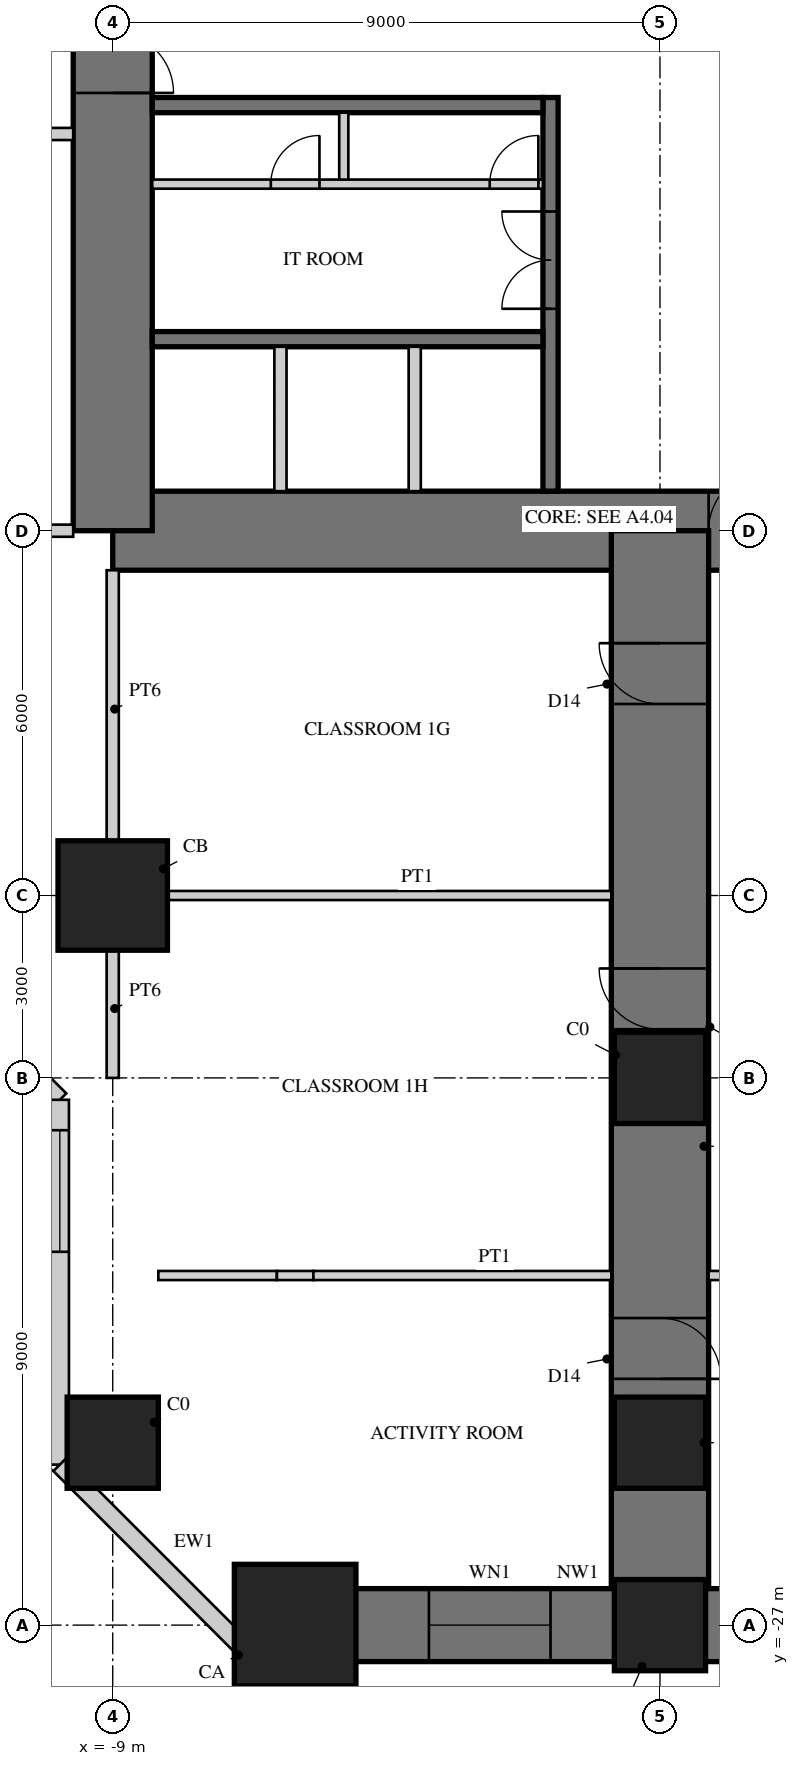
"""IFC4 building model, lengths in metres.
Left out: names, types, materials, properties, quantities, classifications, styles, units other than length and angle.
Written with IfcOpenShell. Run it as: python <this file> out.ifc"""

import sys

from ifc_helpers import new_model, si_unit, direction, frame, frame_2d, origin, origin_2d, place, context, subcontext, project, spatial, rectangle, hollow_rectangle, extrude, element, fill, save


model = new_model("IFC4")
c1 = context("Model", 3, precision=1e-05, world=origin(), true_north=direction((0.0, 1.0)))
c2 = subcontext(c1, "Body", "Model", "MODEL_VIEW")
j1 = project(units=[si_unit("LENGTHUNIT", "METRE"), si_unit("PLANEANGLEUNIT", "RADIAN")], contexts=[c1])
p1 = place(None, origin())
s1 = spatial("IfcSite", under=j1, at=p1, CompositionType="ELEMENT")
p2 = place(p1, origin())
s2 = spatial("IfcBuilding", under=s1, at=p2, CompositionType="ELEMENT")
p3 = place(p2, frame((0.0, 0.0, 5.0)))
s3 = spatial("IfcBuildingStorey", under=s2, at=p3, CompositionType="ELEMENT", Elevation=5.0)
p4 = place(p3, frame((-9.0, -9.0, 0.0), z_axis=(0.0, 0.0, 1.0), x_axis=(1.0, 0.0, 0.0)))
e1 = element("IfcWall", 1, at=p4, inside=s3, PredefinedType="SHEAR", context=c2, shape_type="SweptSolid", body=[
    extrude(rectangle(XDim=18.0, YDim=1.3, at=frame_2d((9.0, 0.0))), origin(), (0.0, 0.0, 1.0), 4.5),
])
p5 = place(p4, frame((9.8, 0.0, 0.0)))
e2 = element("IfcOpeningElement", 2, at=p5, cuts=e1, PredefinedType="OPENING", context=c2, shape_type="SweptSolid", body=[
    extrude(rectangle(XDim=1.0, YDim=2.4, at=frame_2d((0.5, 1.2))), frame((0.0, 0.66, 0.0), z_axis=(0.0, -1.0, 0.0), x_axis=(1.0, 0.0, 0.0)), (0.0, 0.0, 1.0), 1.32),
])
p6 = place(p3, frame((-9.0, 9.0, 0.0), z_axis=(0.0, 0.0, 1.0), x_axis=(0.0, -1.0, 0.0)))
e3 = element("IfcWall", 3, at=p6, inside=s3, PredefinedType="SHEAR", context=c2, shape_type="SweptSolid", body=[
    extrude(rectangle(XDim=18.0, YDim=1.3, at=frame_2d((9.0, 0.0))), origin(), (0.0, 0.0, 1.0), 4.5),
])
p7 = place(p6, frame((9.8, 0.0, 0.0)))
e4 = element("IfcOpeningElement", 4, at=p7, cuts=e3, PredefinedType="OPENING", context=c2, shape_type="SweptSolid", body=[
    extrude(rectangle(XDim=1.0, YDim=2.4, at=frame_2d((0.5, 1.2))), frame((0.0, 0.66, 0.0), z_axis=(0.0, -1.0, 0.0), x_axis=(1.0, 0.0, 0.0)), (0.0, 0.0, 1.0), 1.32),
])
p8 = place(p3, frame((-1.8, -1.875, 0.0), z_axis=(0.0, 0.0, 1.0), x_axis=(0.0, -1.0, 0.0)))
e5 = element("IfcWall", 5, at=p8, inside=s3, PredefinedType="SHEAR", context=c2, shape_type="SweptSolid", body=[
    extrude(rectangle(XDim=6.475, YDim=0.25, at=frame_2d((3.238, 0.0))), origin(), (0.0, 0.0, 1.0), 4.5),
])
p9 = place(p8, frame((1.875, 0.0, 0.0)))
e6 = element("IfcOpeningElement", 6, at=p9, cuts=e5, PredefinedType="OPENING", context=c2, shape_type="SweptSolid", body=[
    extrude(rectangle(XDim=1.6, YDim=2.4, at=frame_2d((0.8, 1.2))), frame((0.0, 0.135, 0.0), z_axis=(0.0, -1.0, 0.0), x_axis=(1.0, 0.0, 0.0)), (0.0, 0.0, 1.0), 0.27),
])
for number, where, z_axis, x_axis in (
    (7, (-1.925, -2.0, 0.0), (0.0, 0.0, 1.0), (-1.0, 0.0, 0.0)),
    (8, (-1.925, -5.85, 0.0), (0.0, 0.0, 1.0), (-1.0, 0.0, 0.0)),
):
    element("IfcWall", number, at=place(p3, frame(where, z_axis=z_axis, x_axis=x_axis)), inside=s3, PredefinedType="SHEAR", context=c2, shape_type="SweptSolid", body=[
        extrude(rectangle(XDim=6.425, YDim=0.25, at=frame_2d((3.212, 0.0))), origin(), (0.0, 0.0, 1.0), 4.5),
    ])
p10 = place(p3, frame((-1.925, -3.3, 0.0), z_axis=(0.0, 0.0, 1.0), x_axis=(-1.0, 0.0, 0.0)))
e9 = element("IfcWall", 9, at=p10, inside=s3, PredefinedType="PARTITIONING", context=c2, shape_type="SweptSolid", body=[
    extrude(rectangle(XDim=6.425, YDim=0.15, at=frame_2d((3.212, 0.0))), origin(), (0.0, 0.0, 1.0), 4.5),
])
p11 = place(p10, frame((0.075, 0.0, 0.0)))
e10 = element("IfcOpeningElement", 10, at=p11, cuts=e9, PredefinedType="OPENING", context=c2, shape_type="SweptSolid", body=[
    extrude(rectangle(XDim=0.8, YDim=2.1, at=frame_2d((0.4, 1.05))), frame((0.0, 0.085, 0.0), z_axis=(0.0, -1.0, 0.0), x_axis=(1.0, 0.0, 0.0)), (0.0, 0.0, 1.0), 0.17),
])
p12 = place(p10, frame((3.675, 0.0, 0.0)))
e11 = element("IfcOpeningElement", 11, at=p12, cuts=e9, PredefinedType="OPENING", context=c2, shape_type="SweptSolid", body=[
    extrude(rectangle(XDim=0.8, YDim=2.1, at=frame_2d((0.4, 1.05))), frame((0.0, 0.085, 0.0), z_axis=(0.0, -1.0, 0.0), x_axis=(1.0, 0.0, 0.0)), (0.0, 0.0, 1.0), 0.17),
])
p13 = place(p3, frame((-5.2, -2.125, 0.0), z_axis=(0.0, 0.0, 1.0), x_axis=(0.0, -1.0, 0.0)))
e12 = element("IfcWall", 12, at=p13, inside=s3, PredefinedType="PARTITIONING", context=c2, shape_type="SweptSolid", body=[
    extrude(rectangle(XDim=1.1, YDim=0.15, at=frame_2d((0.55, 0.0))), origin(), (0.0, 0.0, 1.0), 4.5),
])
for number, where, z_axis, x_axis in (
    (13, (-4.033, -5.975, 0.0), (0.0, 0.0, 1.0), (0.0, -1.0, 0.0)),
    (14, (-6.242, -5.975, 0.0), (0.0, 0.0, 1.0), (0.0, -1.0, 0.0)),
):
    element("IfcWall", number, at=place(p3, frame(where, z_axis=z_axis, x_axis=x_axis)), inside=s3, PredefinedType="PARTITIONING", context=c2, shape_type="SweptSolid", body=[
        extrude(rectangle(XDim=2.375, YDim=0.2, at=frame_2d((1.188, 0.0))), origin(), (0.0, 0.0, 1.0), 4.5),
    ])
p14 = place(p3, frame((0.0, -9.0, 0.0), z_axis=(0.0, 0.0, 1.0), x_axis=(0.0, -1.0, 0.0)))
e15 = element("IfcWall", 15, at=p14, inside=s3, PredefinedType="SHEAR", context=c2, shape_type="SweptSolid", body=[
    extrude(rectangle(XDim=18.0, YDim=1.6, at=frame_2d((9.0, 0.0))), origin(), (0.0, 0.0, 1.0), 4.5),
])
p15 = place(p14, frame((1.85, 0.0, 0.0)))
e16 = element("IfcOpeningElement", 16, at=p15, cuts=e15, PredefinedType="OPENING", context=c2, shape_type="SweptSolid", body=[
    extrude(rectangle(XDim=1.0, YDim=2.2, at=frame_2d((0.5, 1.1))), frame((0.0, 0.81, 0.0), z_axis=(0.0, -1.0, 0.0), x_axis=(1.0, 0.0, 0.0)), (0.0, 0.0, 1.0), 1.62),
])
p16 = place(p14, frame((7.2, 0.0, 0.0)))
e17 = element("IfcOpeningElement", 17, at=p16, cuts=e15, PredefinedType="OPENING", context=c2, shape_type="SweptSolid", body=[
    extrude(rectangle(XDim=1.0, YDim=2.2, at=frame_2d((0.5, 1.1))), frame((0.0, 0.81, 0.0), z_axis=(0.0, -1.0, 0.0), x_axis=(1.0, 0.0, 0.0)), (0.0, 0.0, 1.0), 1.62),
])
p17 = place(p14, frame((12.95, 0.0, 0.0)))
e18 = element("IfcOpeningElement", 18, at=p17, cuts=e15, PredefinedType="OPENING", context=c2, shape_type="SweptSolid", body=[
    extrude(rectangle(XDim=1.0, YDim=2.2, at=frame_2d((0.5, 1.1))), frame((0.0, 0.81, 0.0), z_axis=(0.0, -1.0, 0.0), x_axis=(1.0, 0.0, 0.0)), (0.0, 0.0, 1.0), 1.62),
])
p18 = place(p3, frame((-6.0, -27.0, 0.0), z_axis=(0.0, 0.0, 1.0), x_axis=(1.0, 0.0, 0.0)))
e19 = element("IfcWall", 19, at=p18, inside=s3, PredefinedType="SHEAR", context=c2, shape_type="SweptSolid", body=[
    extrude(rectangle(XDim=12.0, YDim=1.2, at=frame_2d((6.0, 0.0))), origin(), (0.0, 0.0, 1.0), 4.5),
])
p19 = place(p18, frame((2.2, 0.0, 0.9)))
e20 = element("IfcOpeningElement", 20, at=p19, cuts=e19, PredefinedType="OPENING", context=c2, shape_type="SweptSolid", body=[
    extrude(rectangle(XDim=2.0, YDim=1.8, at=frame_2d((1.0, 0.9))), frame((0.0, 0.61, 0.0), z_axis=(0.0, -1.0, 0.0), x_axis=(1.0, 0.0, 0.0)), (0.0, 0.0, 1.0), 1.22),
])
p20 = place(p18, frame((7.8, 0.0, 0.9)))
e21 = element("IfcOpeningElement", 21, at=p20, cuts=e19, PredefinedType="OPENING", context=c2, shape_type="SweptSolid", body=[
    extrude(rectangle(XDim=2.0, YDim=1.8, at=frame_2d((1.0, 0.9))), frame((0.0, 0.61, 0.0), z_axis=(0.0, -1.0, 0.0), x_axis=(1.0, 0.0, 0.0)), (0.0, 0.0, 1.0), 1.22),
])
p21 = place(p3, frame((-9.0, -15.0, 0.0), z_axis=(0.0, 0.0, 1.0), x_axis=(1.0, 0.0, 0.0)))
e22 = element("IfcColumn", 22, at=p21, inside=s3, PredefinedType="COLUMN", context=c2, shape_type="SweptSolid", body=[
    extrude(rectangle(XDim=1.8, YDim=1.8, at=origin_2d()), origin(), (0.0, 0.0, 1.0), 4.5),
])
p22 = place(p3, frame((-9.0, -24.0, 0.0), z_axis=(0.0, 0.0, 1.0), x_axis=(1.0, 0.0, 0.0)))
e23 = element("IfcColumn", 23, at=p22, inside=s3, PredefinedType="COLUMN", context=c2, shape_type="SweptSolid", body=[
    extrude(rectangle(XDim=1.5, YDim=1.5, at=origin_2d()), origin(), (0.0, 0.0, 1.0), 4.5),
])
p23 = place(p3, frame((-6.0, -27.0, 0.0), z_axis=(0.0, 0.0, 1.0), x_axis=(1.0, 0.0, 0.0)))
e24 = element("IfcColumn", 24, at=p23, inside=s3, PredefinedType="COLUMN", context=c2, shape_type="SweptSolid", body=[
    extrude(rectangle(XDim=2.0, YDim=2.0, at=origin_2d()), origin(), (0.0, 0.0, 1.0), 4.5),
])
for number, where, z_axis, x_axis in (
    (25, (0.0, -27.0, 0.0), (0.0, 0.0, 1.0), (1.0, 0.0, 0.0)),
    (26, (0.0, -18.0, 0.0), (0.0, 0.0, 1.0), (1.0, 0.0, 0.0)),
    (27, (0.0, -24.0, 0.0), (0.0, 0.0, 1.0), (1.0, 0.0, 0.0)),
):
    element("IfcColumn", number, at=place(p3, frame(where, z_axis=z_axis, x_axis=x_axis)), inside=s3, PredefinedType="COLUMN", context=c2, shape_type="SweptSolid", body=[
        extrude(rectangle(XDim=1.5, YDim=1.5, at=origin_2d()), origin(), (0.0, 0.0, 1.0), 4.5),
    ])
p24 = place(p3, frame((-18.36, -9.87, 0.0), z_axis=(0.0, 0.0, 1.0), x_axis=(0.707106781187, -0.707106781187, 0.0)))
e28 = element("IfcWall", 28, at=p24, inside=s3, PredefinedType="SOLIDWALL", context=c2, shape_type="SweptSolid", body=[
    extrude(rectangle(XDim=12.007, YDim=0.3, at=frame_2d((6.003, 0.0))), origin(), (0.0, 0.0, 1.0), 4.3),
])
p25 = place(p24, frame((0.501, 0.0, 0.9)))
e29 = element("IfcOpeningElement", 29, at=p25, cuts=e28, PredefinedType="OPENING", context=c2, shape_type="SweptSolid", body=[
    extrude(rectangle(XDim=2.0, YDim=1.8, at=frame_2d((1.0, 0.9))), frame((0.0, 0.16, 0.0), z_axis=(0.0, -1.0, 0.0), x_axis=(1.0, 0.0, 0.0)), (0.0, 0.0, 1.0), 0.32),
])
p26 = place(p24, frame((9.506, 0.0, 0.9)))
e30 = element("IfcOpeningElement", 30, at=p26, cuts=e28, PredefinedType="OPENING", context=c2, shape_type="SweptSolid", body=[
    extrude(rectangle(XDim=2.0, YDim=1.8, at=frame_2d((1.0, 0.9))), frame((0.0, 0.16, 0.0), z_axis=(0.0, -1.0, 0.0), x_axis=(1.0, 0.0, 0.0)), (0.0, 0.0, 1.0), 0.32),
])
p27 = place(p3, frame((-9.87, -18.36, 0.0), z_axis=(0.0, 0.0, 1.0), x_axis=(0.0, -1.0, 0.0)))
e31 = element("IfcWall", 31, at=p27, inside=s3, PredefinedType="SOLIDWALL", context=c2, shape_type="SweptSolid", body=[
    extrude(rectangle(XDim=6.0, YDim=0.3, at=frame_2d((3.0, 0.0))), origin(), (0.0, 0.0, 1.0), 4.3),
])
p28 = place(p27, frame((0.5, 0.0, 0.9)))
e32 = element("IfcOpeningElement", 32, at=p28, cuts=e31, PredefinedType="OPENING", context=c2, shape_type="SweptSolid", body=[
    extrude(rectangle(XDim=2.0, YDim=1.8, at=frame_2d((1.0, 0.9))), frame((0.0, 0.16, 0.0), z_axis=(0.0, -1.0, 0.0), x_axis=(1.0, 0.0, 0.0)), (0.0, 0.0, 1.0), 0.32),
])
p29 = place(p3, frame((-9.87, -24.36, 0.0), z_axis=(0.0, 0.0, 1.0), x_axis=(0.707106781187, -0.707106781187, 0.0)))
e33 = element("IfcWall", 33, at=p29, inside=s3, PredefinedType="SOLIDWALL", context=c2, shape_type="SweptSolid", body=[
    extrude(rectangle(XDim=4.582, YDim=0.3, at=frame_2d((2.291, 0.0))), origin(), (0.0, 0.0, 1.0), 4.3),
])
p30 = place(p3, frame((-8.25, -15.0, 0.0), z_axis=(0.0, 0.0, 1.0), x_axis=(1.0, 0.0, 0.0)))
e34 = element("IfcWall", 34, at=p30, inside=s3, PredefinedType="PARTITIONING", context=c2, shape_type="SweptSolid", body=[
    extrude(rectangle(XDim=7.45, YDim=0.15, at=frame_2d((3.725, 0.0))), origin(), (0.0, 0.0, 1.0), 3.35),
])
p31 = place(p3, frame((-8.25, -21.25, 0.0), z_axis=(0.0, 0.0, 1.0), x_axis=(1.0, 0.0, 0.0)))
e35 = element("IfcWall", 35, at=p31, inside=s3, PredefinedType="PARTITIONING", context=c2, shape_type="SweptSolid", body=[
    extrude(rectangle(XDim=1.95, YDim=0.15, at=frame_2d((0.975, 0.0))), origin(), (0.0, 0.0, 1.0), 3.35),
])
p32 = place(p3, frame((-6.3, -21.25, 0.0), z_axis=(0.0, 0.0, 1.0), x_axis=(1.0, 0.0, 0.0)))
e36 = element("IfcWall", 36, at=p32, inside=s3, PredefinedType="PARTITIONING", context=c2, shape_type="SweptSolid", body=[
    extrude(rectangle(XDim=0.6, YDim=0.15, at=frame_2d((0.3, 0.0))), origin(), (0.0, 0.0, 1.0), 4.3),
])
p33 = place(p3, frame((-5.7, -21.25, 0.0), z_axis=(0.0, 0.0, 1.0), x_axis=(1.0, 0.0, 0.0)))
e37 = element("IfcWall", 37, at=p33, inside=s3, PredefinedType="PARTITIONING", context=c2, shape_type="SweptSolid", body=[
    extrude(rectangle(XDim=4.9, YDim=0.15, at=frame_2d((2.45, 0.0))), origin(), (0.0, 0.0, 1.0), 3.35),
])
p34 = place(p3, frame((0.8, -21.25, 0.0), z_axis=(0.0, 0.0, 1.0), x_axis=(1.0, 0.0, 0.0)))
e38 = element("IfcWall", 38, at=p34, inside=s3, PredefinedType="PARTITIONING", context=c2, shape_type="SweptSolid", body=[
    extrude(rectangle(XDim=4.9, YDim=0.15, at=frame_2d((2.45, 0.0))), origin(), (0.0, 0.0, 1.0), 3.35),
])
p35 = place(p34, frame((0.35, 0.0, 0.0)))
e39 = element("IfcOpeningElement", 39, at=p35, cuts=e38, PredefinedType="OPENING", context=c2, shape_type="SweptSolid", body=[
    extrude(rectangle(XDim=1.0, YDim=2.2, at=frame_2d((0.5, 1.1))), frame((0.0, 0.085, 0.0), z_axis=(0.0, -1.0, 0.0), x_axis=(1.0, 0.0, 0.0)), (0.0, 0.0, 1.0), 0.17),
])
p36 = place(p3, frame((-9.65, -2.475, 0.0), z_axis=(0.0, 0.0, 1.0), x_axis=(-1.0, 0.0, 0.0)))
e40 = element("IfcWall", 40, at=p36, inside=s3, PredefinedType="SOLIDWALL", context=c2, shape_type="SweptSolid", body=[
    extrude(rectangle(XDim=11.6, YDim=0.2, at=frame_2d((5.8, 0.0))), origin(), (0.0, 0.0, 1.0), 4.3),
])
p37 = place(p36, frame((1.2, 0.0, 0.0)))
e41 = element("IfcOpeningElement", 41, at=p37, cuts=e40, PredefinedType="OPENING", context=c2, shape_type="SweptSolid", body=[
    extrude(rectangle(XDim=1.0, YDim=2.2, at=frame_2d((0.5, 1.1))), frame((0.0, 0.11, 0.0), z_axis=(0.0, -1.0, 0.0), x_axis=(1.0, 0.0, 0.0)), (0.0, 0.0, 1.0), 0.22),
])
p38 = place(p36, frame((6.55, 0.0, 0.0)))
e42 = element("IfcOpeningElement", 42, at=p38, cuts=e40, PredefinedType="OPENING", context=c2, shape_type="SweptSolid", body=[
    extrude(rectangle(XDim=1.0, YDim=2.2, at=frame_2d((0.5, 1.1))), frame((0.0, 0.11, 0.0), z_axis=(0.0, -1.0, 0.0), x_axis=(1.0, 0.0, 0.0)), (0.0, 0.0, 1.0), 0.22),
])
p39 = place(p3, frame((-9.65, -9.0, 0.0), z_axis=(0.0, 0.0, 1.0), x_axis=(-1.0, 0.0, 0.0)))
e43 = element("IfcWall", 43, at=p39, inside=s3, PredefinedType="SOLIDWALL", context=c2, shape_type="SweptSolid", body=[
    extrude(rectangle(XDim=4.6, YDim=0.2, at=frame_2d((2.3, 0.0))), origin(), (0.0, 0.0, 1.0), 3.3),
])
p40 = place(p39, frame((1.2, 0.0, 0.0)))
e44 = element("IfcOpeningElement", 44, at=p40, cuts=e43, PredefinedType="OPENING", context=c2, shape_type="SweptSolid", body=[
    extrude(rectangle(XDim=1.0, YDim=2.2, at=frame_2d((0.5, 1.1))), frame((0.0, 0.11, 0.0), z_axis=(0.0, -1.0, 0.0), x_axis=(1.0, 0.0, 0.0)), (0.0, 0.0, 1.0), 0.22),
])
p41 = place(p3, frame((-9.0, -14.25, 0.0), z_axis=(0.0, 0.0, 1.0), x_axis=(0.0, 1.0, 0.0)))
e45 = element("IfcWall", 45, at=p41, inside=s3, PredefinedType="SOLIDWALL", context=c2, shape_type="SweptSolid", body=[
    extrude(rectangle(XDim=4.6, YDim=0.2, at=frame_2d((2.3, 0.0))), origin(), (0.0, 0.0, 1.0), 3.3),
])
p42 = place(p3, frame((-9.0, -18.0, 0.0), z_axis=(0.0, 0.0, 1.0), x_axis=(0.0, 1.0, 0.0)))
e46 = element("IfcWall", 46, at=p42, inside=s3, PredefinedType="SOLIDWALL", context=c2, shape_type="SweptSolid", body=[
    extrude(rectangle(XDim=2.25, YDim=0.2, at=frame_2d((1.125, 0.0))), origin(), (0.0, 0.0, 1.0), 3.3),
])
p43 = place(p28, origin())
e47 = element("IfcWindow", 47, at=p43, inside=s3, PartitioningType="SINGLE_PANEL", PredefinedType="WINDOW", context=c2, shape_type="SweptSolid", body=[
    extrude(hollow_rectangle(XDim=2.0, YDim=1.8, WallThickness=0.06, at=frame_2d((1.0, 0.9))), frame((0.0, 0.03, 0.0), z_axis=(0.0, -1.0, 0.0), x_axis=(1.0, 0.0, 0.0)), (0.0, 0.0, 1.0), 0.06),
    extrude(rectangle(XDim=1.879, YDim=1.679, at=frame_2d((1.0, 0.9))), frame((0.0, 0.03, 0.0), z_axis=(0.0, -1.0, 0.0), x_axis=(1.0, 0.0, 0.0)), (0.0, 0.0, 1.0), 0.06),
])
fill(e32, e47)
p44 = place(p19, origin())
e48 = element("IfcWindow", 48, at=p44, inside=s3, PartitioningType="SINGLE_PANEL", PredefinedType="WINDOW", context=c2, shape_type="SweptSolid", body=[
    extrude(hollow_rectangle(XDim=2.0, YDim=1.8, WallThickness=0.06, at=frame_2d((1.0, 0.9))), frame((0.0, 0.03, 0.0), z_axis=(0.0, -1.0, 0.0), x_axis=(1.0, 0.0, 0.0)), (0.0, 0.0, 1.0), 0.06),
    extrude(rectangle(XDim=1.879, YDim=1.679, at=frame_2d((1.0, 0.9))), frame((0.0, 0.03, 0.0), z_axis=(0.0, -1.0, 0.0), x_axis=(1.0, 0.0, 0.0)), (0.0, 0.0, 1.0), 0.06),
])
fill(e20, e48)
p45 = place(p15, frame((1.0, 0.0, 0.0), z_axis=(0.0, 0.0, 1.0), x_axis=(-1.0, 0.0, 0.0)))
e49 = element("IfcDoor", 49, at=p45, inside=s3, OperationType="SINGLE_SWING_RIGHT", PredefinedType="DOOR", context=c2, shape_type="SweptSolid", body=[
    extrude(rectangle(XDim=1.0, YDim=2.2, at=frame_2d((0.5, 1.1))), frame((0.0, 0.025, 0.0), z_axis=(0.0, -1.0, 0.0), x_axis=(1.0, 0.0, 0.0)), (0.0, 0.0, 1.0), 0.05),
])
fill(e16, e49)
p46 = place(p16, frame((1.0, 0.0, 0.0), z_axis=(0.0, 0.0, 1.0), x_axis=(-1.0, 0.0, 0.0)))
e50 = element("IfcDoor", 50, at=p46, inside=s3, OperationType="SINGLE_SWING_RIGHT", PredefinedType="DOOR", context=c2, shape_type="SweptSolid", body=[
    extrude(rectangle(XDim=1.0, YDim=2.2, at=frame_2d((0.5, 1.1))), frame((0.0, 0.025, 0.0), z_axis=(0.0, -1.0, 0.0), x_axis=(1.0, 0.0, 0.0)), (0.0, 0.0, 1.0), 0.05),
])
fill(e17, e50)
p47 = place(p17, origin())
e51 = element("IfcDoor", 51, at=p47, inside=s3, OperationType="SINGLE_SWING_RIGHT", PredefinedType="DOOR", context=c2, shape_type="SweptSolid", body=[
    extrude(rectangle(XDim=1.0, YDim=2.2, at=frame_2d((0.5, 1.1))), frame((0.0, 0.025, 0.0), z_axis=(0.0, -1.0, 0.0), x_axis=(1.0, 0.0, 0.0)), (0.0, 0.0, 1.0), 0.05),
])
fill(e18, e51)
p48 = place(p5, origin())
e52 = element("IfcDoor", 52, at=p48, inside=s3, OperationType="SINGLE_SWING_RIGHT", PredefinedType="DOOR", context=c2, shape_type="SweptSolid", body=[
    extrude(rectangle(XDim=1.0, YDim=2.4, at=frame_2d((0.5, 1.2))), frame((0.0, 0.055, 0.0), z_axis=(0.0, -1.0, 0.0), x_axis=(1.0, 0.0, 0.0)), (0.0, 0.0, 1.0), 0.05),
])
fill(e2, e52)
p49 = place(p7, origin())
e53 = element("IfcDoor", 53, at=p49, inside=s3, OperationType="SINGLE_SWING_RIGHT", PredefinedType="DOOR", context=c2, shape_type="SweptSolid", body=[
    extrude(rectangle(XDim=1.0, YDim=2.4, at=frame_2d((0.5, 1.2))), frame((0.0, 0.055, 0.0), z_axis=(0.0, -1.0, 0.0), x_axis=(1.0, 0.0, 0.0)), (0.0, 0.0, 1.0), 0.05),
])
fill(e4, e53)
p50 = place(p9, frame((1.6, 0.0, 0.0), z_axis=(0.0, 0.0, 1.0), x_axis=(-1.0, 0.0, 0.0)))
e54 = element("IfcDoor", 54, at=p50, inside=s3, OperationType="DOUBLE_DOOR_SINGLE_SWING", PredefinedType="DOOR", context=c2, shape_type="SweptSolid", body=[
    extrude(rectangle(XDim=1.6, YDim=2.4, at=frame_2d((0.8, 1.2))), frame((0.0, 0.025, 0.0), z_axis=(0.0, -1.0, 0.0), x_axis=(1.0, 0.0, 0.0)), (0.0, 0.0, 1.0), 0.05),
])
fill(e6, e54)
p51 = place(p11, frame((0.8, 0.0, 0.0), z_axis=(0.0, 0.0, 1.0), x_axis=(-1.0, 0.0, 0.0)))
e55 = element("IfcDoor", 55, at=p51, inside=s3, OperationType="SINGLE_SWING_RIGHT", PredefinedType="DOOR", context=c2, shape_type="SweptSolid", body=[
    extrude(rectangle(XDim=0.8, YDim=2.1, at=frame_2d((0.4, 1.05))), frame((0.0, 0.025, 0.0), z_axis=(0.0, -1.0, 0.0), x_axis=(1.0, 0.0, 0.0)), (0.0, 0.0, 1.0), 0.05),
])
fill(e10, e55)
p52 = place(p12, frame((0.8, 0.0, 0.0), z_axis=(0.0, 0.0, 1.0), x_axis=(-1.0, 0.0, 0.0)))
e56 = element("IfcDoor", 56, at=p52, inside=s3, OperationType="SINGLE_SWING_RIGHT", PredefinedType="DOOR", context=c2, shape_type="SweptSolid", body=[
    extrude(rectangle(XDim=0.8, YDim=2.1, at=frame_2d((0.4, 1.05))), frame((0.0, 0.025, 0.0), z_axis=(0.0, -1.0, 0.0), x_axis=(1.0, 0.0, 0.0)), (0.0, 0.0, 1.0), 0.05),
])
fill(e11, e56)
save(model, sys.argv[1])
